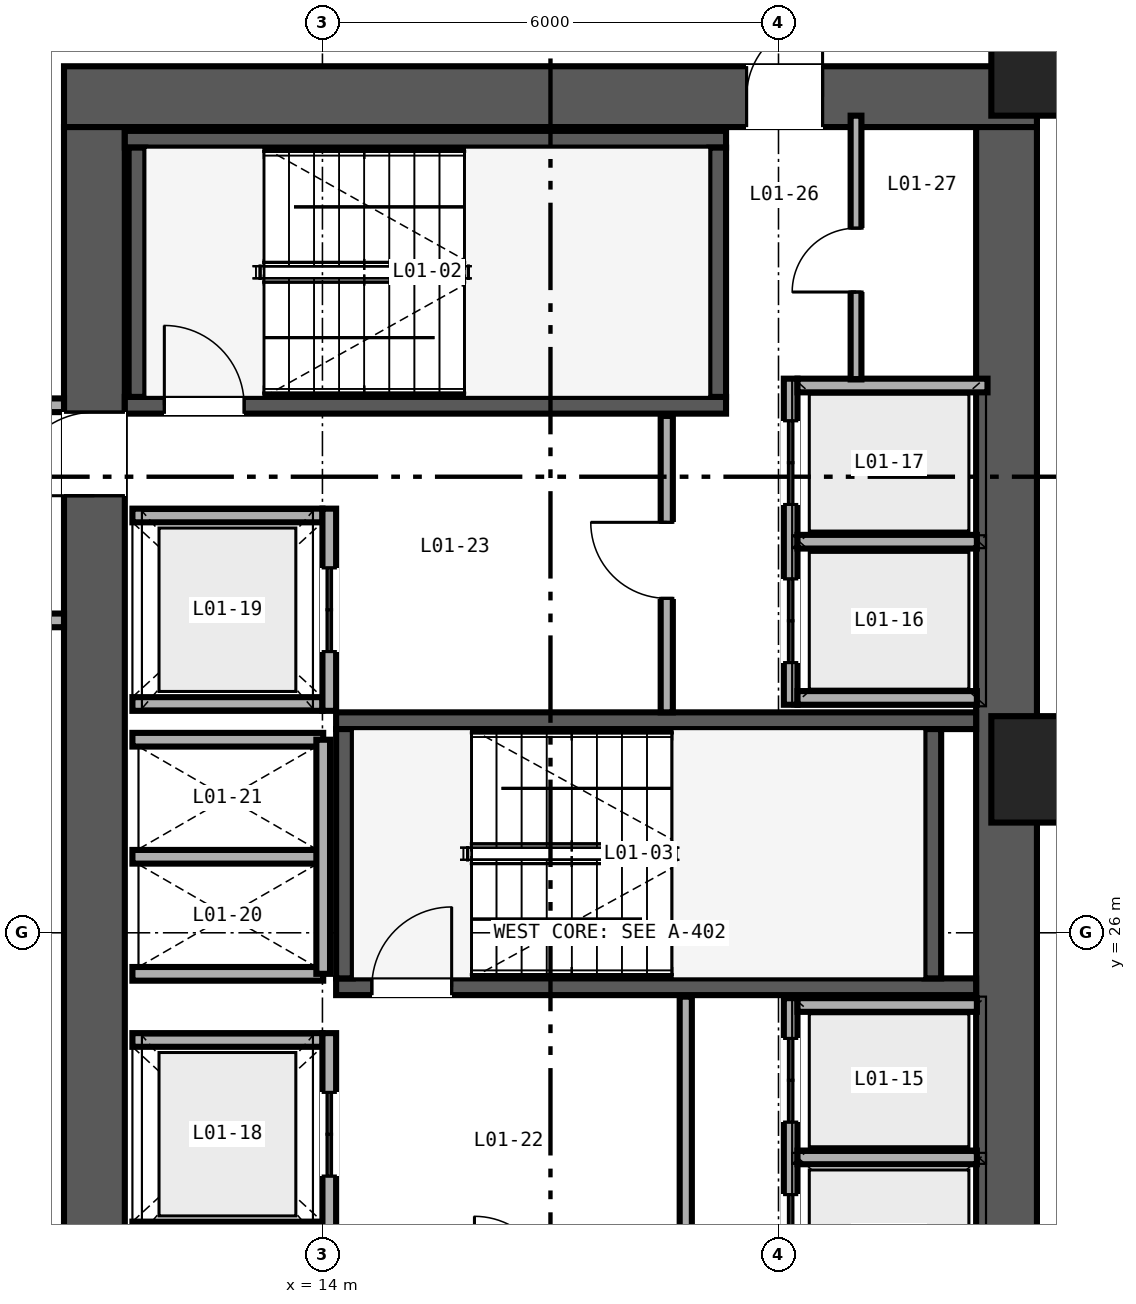
"""IFC4 building model, lengths in metres.
Left out: names, types, materials, properties, quantities, classifications, styles, units other than length and angle.
Written with IfcOpenShell. Run it as: python <this file> out.ifc"""

import sys

from ifc_helpers import new_model, si_unit, direction, frame, frame_2d, origin, origin_2d, place, context, subcontext, project, spatial, rectangle, extrude, source, transform, mapped, element, fill, save


model = new_model("IFC4")
c1 = context("Model", 3, precision=1e-05, world=origin(), true_north=direction((0.0, 1.0)))
c2 = subcontext(c1, "Body", "Model", "MODEL_VIEW")
j1 = project(units=[si_unit("LENGTHUNIT", "METRE"), si_unit("PLANEANGLEUNIT", "RADIAN")], contexts=[c1])
p1 = place(None, origin())
s1 = spatial("IfcSite", under=j1, at=p1, CompositionType="ELEMENT")
p2 = place(p1, origin())
s2 = spatial("IfcBuilding", under=s1, at=p2, CompositionType="ELEMENT")
p3 = place(p2, origin())
s3 = spatial("IfcBuildingStorey", under=s2, at=p3, CompositionType="ELEMENT", Elevation=0.0)
p4 = place(p3, frame((10.6, 37.0, 0.0), z_axis=(0.0, 0.0, 1.0), x_axis=(1.0, 0.0, 0.0)))
e1 = element("IfcWall", 1, at=p4, inside=s3, PredefinedType="SHEAR", context=c2, shape_type="SweptSolid", body=[
    extrude(rectangle(XDim=12.8, YDim=0.8, at=frame_2d((6.4, 0.0))), origin(), (0.0, 0.0, 1.0), 5.71),
])
p5 = place(p4, frame((8.98, 0.0, 0.0)))
e2 = element("IfcOpeningElement", 2, at=p5, cuts=e1, PredefinedType="OPENING", context=c2, shape_type="SweptSolid", body=[
    extrude(rectangle(XDim=1.0, YDim=2.15, at=frame_2d((0.5, 1.075))), frame((0.0, 0.41, 0.0), z_axis=(0.0, -1.0, 0.0), x_axis=(1.0, 0.0, 0.0)), (0.0, 0.0, 1.0), 0.82),
])
p6 = place(p3, frame((11.0, 15.4, 0.0), z_axis=(0.0, 0.0, 1.0), x_axis=(0.0, 1.0, 0.0)))
e3 = element("IfcWall", 3, at=p6, inside=s3, PredefinedType="SHEAR", context=c2, shape_type="SweptSolid", body=[
    extrude(rectangle(XDim=21.2, YDim=0.8, at=frame_2d((10.6, 0.0))), origin(), (0.0, 0.0, 1.0), 5.71),
])
p7 = place(p6, frame((4.15, 0.0, 0.0)))
e4 = element("IfcOpeningElement", 4, at=p7, cuts=e3, PredefinedType="OPENING", context=c2, shape_type="SweptSolid", body=[
    extrude(rectangle(XDim=1.1, YDim=2.15, at=frame_2d((0.55, 1.075))), frame((0.0, 0.41, 0.0), z_axis=(0.0, -1.0, 0.0), x_axis=(1.0, 0.0, 0.0)), (0.0, 0.0, 1.0), 0.82),
])
p8 = place(p6, frame((16.35, 0.0, 0.0)))
e5 = element("IfcOpeningElement", 5, at=p8, cuts=e3, PredefinedType="OPENING", context=c2, shape_type="SweptSolid", body=[
    extrude(rectangle(XDim=1.1, YDim=2.15, at=frame_2d((0.55, 1.075))), frame((0.0, 0.41, 0.0), z_axis=(0.0, -1.0, 0.0), x_axis=(1.0, 0.0, 0.0)), (0.0, 0.0, 1.0), 0.82),
])
p9 = place(p3, frame((23.0, 15.4, 0.0), z_axis=(0.0, 0.0, 1.0), x_axis=(0.0, 1.0, 0.0)))
e6 = element("IfcWall", 6, at=p9, inside=s3, PredefinedType="SHEAR", context=c2, shape_type="SweptSolid", body=[
    extrude(rectangle(XDim=21.2, YDim=0.8, at=frame_2d((10.6, 0.0))), origin(), (0.0, 0.0, 1.0), 5.71),
])
p10 = place(p3, frame((11.4, 32.94, 0.0), z_axis=(0.0, 0.0, 1.0), x_axis=(1.0, 0.0, 0.0)))
e7 = element("IfcWall", 7, at=p10, inside=s3, PredefinedType="SHEAR", context=c2, shape_type="SweptSolid", body=[
    extrude(rectangle(XDim=7.91, YDim=0.22, at=frame_2d((3.955, 0.0))), origin(), (0.0, 0.0, 1.0), 5.8),
])
p11 = place(p10, frame((0.52, 0.0, 0.0)))
e8 = element("IfcOpeningElement", 8, at=p11, cuts=e7, PredefinedType="OPENING", context=c2, shape_type="SweptSolid", body=[
    extrude(rectangle(XDim=1.05, YDim=2.15, at=frame_2d((0.525, 1.075))), frame((0.0, 0.12, 0.0), z_axis=(0.0, -1.0, 0.0), x_axis=(1.0, 0.0, 0.0)), (0.0, 0.0, 1.0), 0.24),
])
p12 = place(p3, frame((11.4, 36.44, 0.0), z_axis=(0.0, 0.0, 1.0), x_axis=(1.0, 0.0, 0.0)))
e9 = element("IfcWall", 9, at=p12, inside=s3, PredefinedType="SHEAR", context=c2, shape_type="SweptSolid", body=[
    extrude(rectangle(XDim=7.91, YDim=0.22, at=frame_2d((3.955, 0.0))), origin(), (0.0, 0.0, 1.0), 5.8),
])
for number, where, z_axis, x_axis in (
    (10, (11.56, 33.05, 0.0), (0.0, 0.0, 1.0), (0.0, 1.0, 0.0)),
    (11, (19.2, 33.05, 0.0), (0.0, 0.0, 1.0), (0.0, 1.0, 0.0)),
):
    element("IfcWall", number, at=place(p3, frame(where, z_axis=z_axis, x_axis=x_axis)), inside=s3, PredefinedType="SHEAR", context=c2, shape_type="SweptSolid", body=[
        extrude(rectangle(XDim=3.28, YDim=0.22, at=frame_2d((1.64, 0.0))), origin(), (0.0, 0.0, 1.0), 5.8),
    ])
p13 = place(p3, frame((14.18, 25.29, 0.0), z_axis=(0.0, 0.0, 1.0), x_axis=(1.0, 0.0, 0.0)))
e12 = element("IfcWall", 12, at=p13, inside=s3, PredefinedType="SHEAR", context=c2, shape_type="SweptSolid", body=[
    extrude(rectangle(XDim=8.42, YDim=0.22, at=frame_2d((4.21, 0.0))), origin(), (0.0, 0.0, 1.0), 5.8),
])
p14 = place(p13, frame((0.47, 0.0, 0.0)))
e13 = element("IfcOpeningElement", 13, at=p14, cuts=e12, PredefinedType="OPENING", context=c2, shape_type="SweptSolid", body=[
    extrude(rectangle(XDim=1.05, YDim=2.15, at=frame_2d((0.525, 1.075))), frame((0.0, 0.12, 0.0), z_axis=(0.0, -1.0, 0.0), x_axis=(1.0, 0.0, 0.0)), (0.0, 0.0, 1.0), 0.24),
])
p15 = place(p3, frame((14.18, 28.79, 0.0), z_axis=(0.0, 0.0, 1.0), x_axis=(1.0, 0.0, 0.0)))
e14 = element("IfcWall", 14, at=p15, inside=s3, PredefinedType="SHEAR", context=c2, shape_type="SweptSolid", body=[
    extrude(rectangle(XDim=8.42, YDim=0.22, at=frame_2d((4.21, 0.0))), origin(), (0.0, 0.0, 1.0), 5.8),
])
for number, where, z_axis, x_axis in (
    (15, (14.29, 25.4, 0.0), (0.0, 0.0, 1.0), (0.0, 1.0, 0.0)),
    (16, (22.03, 25.4, 0.0), (0.0, 0.0, 1.0), (0.0, 1.0, 0.0)),
):
    element("IfcWall", number, at=place(p3, frame(where, z_axis=z_axis, x_axis=x_axis)), inside=s3, PredefinedType="SHEAR", context=c2, shape_type="SweptSolid", body=[
        extrude(rectangle(XDim=3.28, YDim=0.22, at=frame_2d((1.64, 0.0))), origin(), (0.0, 0.0, 1.0), 5.8),
    ])
m1 = source(origin(), c2, "Body", "SweptSolid", [
    extrude(rectangle(XDim=1.4, YDim=1.4, at=origin_2d()), origin(), (0.0, 0.0, 1.0), 5.71),
])
for number, where, z_axis, x_axis in (
    (17, (23.5, 28.15, 0.0), (0.0, 0.0, 1.0), (1.0, 0.0, 0.0)),
    (18, (23.5, 37.45, 0.0), (0.0, 0.0, 1.0), (1.0, 0.0, 0.0)),
):
    element("IfcColumn", number, at=place(p3, frame(where, z_axis=z_axis, x_axis=x_axis)), inside=s3, PredefinedType="COLUMN", context=c2, shape_type="MappedRepresentation", body=[
        mapped(m1, transform((0.0, 0.0, 0.0), scale=1.0)),
    ])
p16 = place(p3, frame((20.16, 18.82, 0.0), z_axis=(0.0, 0.0, 1.0), x_axis=(0.0, 1.0, 0.0)))
e19 = element("IfcWall", 19, at=p16, inside=s3, PredefinedType="SOLIDWALL", context=c2, shape_type="SweptSolid", body=[
    extrude(rectangle(XDim=6.32, YDim=0.18, at=frame_2d((3.16, 0.0))), origin(), (0.0, 0.0, 1.0), 4.61),
])
p17 = place(p16, frame((0.555, 0.0, 0.0)))
e20 = element("IfcOpeningElement", 20, at=p17, cuts=e19, PredefinedType="OPENING", context=c2, shape_type="SweptSolid", body=[
    extrude(rectangle(XDim=1.1, YDim=2.2, at=frame_2d((0.55, 1.1))), frame((0.0, 0.1, 0.0), z_axis=(0.0, -1.0, 0.0), x_axis=(1.0, 0.0, 0.0)), (0.0, 0.0, 1.0), 0.2),
])
p18 = place(p16, frame((2.635, 0.0, 0.0)))
e21 = element("IfcOpeningElement", 21, at=p18, cuts=e19, PredefinedType="OPENING", context=c2, shape_type="SweptSolid", body=[
    extrude(rectangle(XDim=1.1, YDim=2.2, at=frame_2d((0.55, 1.1))), frame((0.0, 0.1, 0.0), z_axis=(0.0, -1.0, 0.0), x_axis=(1.0, 0.0, 0.0)), (0.0, 0.0, 1.0), 0.2),
])
p19 = place(p16, frame((4.69, 0.0, 0.0)))
e22 = element("IfcOpeningElement", 22, at=p19, cuts=e19, PredefinedType="OPENING", context=c2, shape_type="SweptSolid", body=[
    extrude(rectangle(XDim=1.1, YDim=2.2, at=frame_2d((0.55, 1.1))), frame((0.0, 0.1, 0.0), z_axis=(0.0, -1.0, 0.0), x_axis=(1.0, 0.0, 0.0)), (0.0, 0.0, 1.0), 0.2),
])
for number, where, z_axis, x_axis in (
    (23, (20.25, 25.05, 0.0), (0.0, 0.0, 1.0), (1.0, 0.0, 0.0)),
    (24, (20.25, 23.045, 0.0), (0.0, 0.0, 1.0), (1.0, 0.0, 0.0)),
):
    element("IfcWall", number, at=place(p3, frame(where, z_axis=z_axis, x_axis=x_axis)), inside=s3, PredefinedType="SOLIDWALL", context=c2, shape_type="SweptSolid", body=[
        extrude(rectangle(XDim=2.36, YDim=0.18, at=frame_2d((1.18, 0.0))), origin(), (0.0, 0.0, 1.0), 5.71),
    ])
p20 = place(p3, frame((20.16, 29.0, 0.0), z_axis=(0.0, 0.0, 1.0), x_axis=(0.0, 1.0, 0.0)))
e25 = element("IfcWall", 25, at=p20, inside=s3, PredefinedType="SOLIDWALL", context=c2, shape_type="SweptSolid", body=[
    extrude(rectangle(XDim=4.29, YDim=0.18, at=frame_2d((2.145, 0.0))), origin(), (0.0, 0.0, 1.0), 5.71),
])
p21 = place(p20, frame((0.555, 0.0, 0.0)))
e26 = element("IfcOpeningElement", 26, at=p21, cuts=e25, PredefinedType="OPENING", context=c2, shape_type="SweptSolid", body=[
    extrude(rectangle(XDim=1.1, YDim=2.2, at=frame_2d((0.55, 1.1))), frame((0.0, 0.1, 0.0), z_axis=(0.0, -1.0, 0.0), x_axis=(1.0, 0.0, 0.0)), (0.0, 0.0, 1.0), 0.2),
])
p22 = place(p20, frame((2.635, 0.0, 0.0)))
e27 = element("IfcOpeningElement", 27, at=p22, cuts=e25, PredefinedType="OPENING", context=c2, shape_type="SweptSolid", body=[
    extrude(rectangle(XDim=1.1, YDim=2.2, at=frame_2d((0.55, 1.1))), frame((0.0, 0.1, 0.0), z_axis=(0.0, -1.0, 0.0), x_axis=(1.0, 0.0, 0.0)), (0.0, 0.0, 1.0), 0.2),
])
p23 = place(p3, frame((20.25, 29.09, 0.0), z_axis=(0.0, 0.0, 1.0), x_axis=(1.0, 0.0, 0.0)))
e28 = element("IfcWall", 28, at=p23, inside=s3, PredefinedType="SOLIDWALL", context=c2, shape_type="SweptSolid", body=[
    extrude(rectangle(XDim=2.36, YDim=0.18, at=frame_2d((1.18, 0.0))), origin(), (0.0, 0.0, 1.0), 5.71),
])
p24 = place(p3, frame((20.25, 33.2, 0.0), z_axis=(0.0, 0.0, 1.0), x_axis=(1.0, 0.0, 0.0)))
e29 = element("IfcWall", 29, at=p24, inside=s3, PredefinedType="SOLIDWALL", context=c2, shape_type="SweptSolid", body=[
    extrude(rectangle(XDim=2.5, YDim=0.18, at=frame_2d((1.25, 0.0))), origin(), (0.0, 0.0, 1.0), 5.71),
])
p25 = place(p3, frame((20.25, 31.145, 0.0), z_axis=(0.0, 0.0, 1.0), x_axis=(1.0, 0.0, 0.0)))
e30 = element("IfcWall", 30, at=p25, inside=s3, PredefinedType="SOLIDWALL", context=c2, shape_type="SweptSolid", body=[
    extrude(rectangle(XDim=2.36, YDim=0.18, at=frame_2d((1.18, 0.0))), origin(), (0.0, 0.0, 1.0), 5.71),
])
for number, where, z_axis, x_axis in (
    (31, (11.5, 22.11, 0.0), (0.0, 0.0, 1.0), (1.0, 0.0, 0.0)),
    (32, (11.5, 24.59, 0.0), (0.0, 0.0, 1.0), (1.0, 0.0, 0.0)),
):
    element("IfcWall", number, at=place(p3, frame(where, z_axis=z_axis, x_axis=x_axis)), inside=s3, PredefinedType="SOLIDWALL", context=c2, shape_type="SweptSolid", body=[
        extrude(rectangle(XDim=2.5, YDim=0.18, at=frame_2d((1.25, 0.0))), origin(), (0.0, 0.0, 1.0), 5.71),
    ])
p26 = place(p3, frame((14.09, 22.02, 0.0), z_axis=(0.0, 0.0, 1.0), x_axis=(0.0, 1.0, 0.0)))
e33 = element("IfcWall", 33, at=p26, inside=s3, PredefinedType="SOLIDWALL", context=c2, shape_type="SweptSolid", body=[
    extrude(rectangle(XDim=2.66, YDim=0.18, at=frame_2d((1.33, 0.0))), origin(), (0.0, 0.0, 1.0), 5.71),
])
p27 = place(p26, frame((0.78, 0.0, 0.0)))
e34 = element("IfcOpeningElement", 34, at=p27, cuts=e33, PredefinedType="OPENING", context=c2, shape_type="SweptSolid", body=[
    extrude(rectangle(XDim=1.1, YDim=2.2, at=frame_2d((0.55, 1.1))), frame((0.0, 0.1, 0.0), z_axis=(0.0, -1.0, 0.0), x_axis=(1.0, 0.0, 0.0)), (0.0, 0.0, 1.0), 0.2),
])
for number, where, z_axis, x_axis in (
    (35, (11.5, 29.01, 0.0), (0.0, 0.0, 1.0), (1.0, 0.0, 0.0)),
    (36, (11.5, 31.49, 0.0), (0.0, 0.0, 1.0), (1.0, 0.0, 0.0)),
):
    element("IfcWall", number, at=place(p3, frame(where, z_axis=z_axis, x_axis=x_axis)), inside=s3, PredefinedType="SOLIDWALL", context=c2, shape_type="SweptSolid", body=[
        extrude(rectangle(XDim=2.5, YDim=0.18, at=frame_2d((1.25, 0.0))), origin(), (0.0, 0.0, 1.0), 5.71),
    ])
p28 = place(p3, frame((14.09, 28.92, 0.0), z_axis=(0.0, 0.0, 1.0), x_axis=(0.0, 1.0, 0.0)))
e37 = element("IfcWall", 37, at=p28, inside=s3, PredefinedType="SOLIDWALL", context=c2, shape_type="SweptSolid", body=[
    extrude(rectangle(XDim=2.66, YDim=0.18, at=frame_2d((1.33, 0.0))), origin(), (0.0, 0.0, 1.0), 5.71),
])
p29 = place(p28, frame((0.78, 0.0, 0.0)))
e38 = element("IfcOpeningElement", 38, at=p29, cuts=e37, PredefinedType="OPENING", context=c2, shape_type="SweptSolid", body=[
    extrude(rectangle(XDim=1.1, YDim=2.2, at=frame_2d((0.55, 1.1))), frame((0.0, 0.1, 0.0), z_axis=(0.0, -1.0, 0.0), x_axis=(1.0, 0.0, 0.0)), (0.0, 0.0, 1.0), 0.2),
])
for number, where, z_axis, x_axis in (
    (39, (11.5, 25.46, 0.0), (0.0, 0.0, 1.0), (1.0, 0.0, 0.0)),
    (40, (11.5, 27.0, 0.0), (0.0, 0.0, 1.0), (1.0, 0.0, 0.0)),
    (41, (11.5, 28.54, 0.0), (0.0, 0.0, 1.0), (1.0, 0.0, 0.0)),
):
    element("IfcWall", number, at=place(p3, frame(where, z_axis=z_axis, x_axis=x_axis)), inside=s3, PredefinedType="SOLIDWALL", context=c2, shape_type="SweptSolid", body=[
        extrude(rectangle(XDim=2.51, YDim=0.18, at=frame_2d((1.255, 0.0))), origin(), (0.0, 0.0, 1.0), 5.71),
    ])
p30 = place(p3, frame((14.01, 25.46, 0.0), z_axis=(0.0, 0.0, 1.0), x_axis=(0.0, 1.0, 0.0)))
e42 = element("IfcWall", 42, at=p30, inside=s3, PredefinedType="SOLIDWALL", context=c2, shape_type="SweptSolid", body=[
    extrude(rectangle(XDim=3.08, YDim=0.18, at=frame_2d((1.54, 0.0))), origin(), (0.0, 0.0, 1.0), 5.71),
])
p31 = place(p3, frame((18.78, 21.35, 0.0), z_axis=(0.0, 0.0, 1.0), x_axis=(0.0, 1.0, 0.0)))
e43 = element("IfcWall", 43, at=p31, inside=s3, PredefinedType="PARTITIONING", context=c2, shape_type="SweptSolid", body=[
    extrude(rectangle(XDim=3.81, YDim=0.16, at=frame_2d((1.905, 0.0))), origin(), (0.0, 0.0, 1.0), 5.71),
])
p32 = place(p3, frame((18.53, 28.9, 0.0), z_axis=(0.0, 0.0, 1.0), x_axis=(0.0, 1.0, 0.0)))
e44 = element("IfcWall", 44, at=p32, inside=s3, PredefinedType="PARTITIONING", context=c2, shape_type="SweptSolid", body=[
    extrude(rectangle(XDim=3.9, YDim=0.16, at=frame_2d((1.95, 0.0))), origin(), (0.0, 0.0, 1.0), 5.71),
])
p33 = place(p32, frame((1.5, 0.0, 0.0)))
e45 = element("IfcOpeningElement", 45, at=p33, cuts=e44, PredefinedType="OPENING", context=c2, shape_type="SweptSolid", body=[
    extrude(rectangle(XDim=1.0, YDim=2.15, at=frame_2d((0.5, 1.075))), frame((0.0, 0.09, 0.0), z_axis=(0.0, -1.0, 0.0), x_axis=(1.0, 0.0, 0.0)), (0.0, 0.0, 1.0), 0.18),
])
p34 = place(p3, frame((21.02, 33.28, 0.0), z_axis=(0.0, 0.0, 1.0), x_axis=(0.0, 1.0, 0.0)))
e46 = element("IfcWall", 46, at=p34, inside=s3, PredefinedType="PARTITIONING", context=c2, shape_type="SweptSolid", body=[
    extrude(rectangle(XDim=3.47, YDim=0.142, at=frame_2d((1.735, 0.0))), origin(), (0.0, 0.0, 1.0), 5.71),
])
p35 = place(p34, frame((1.15, 0.0, 0.0)))
e47 = element("IfcOpeningElement", 47, at=p35, cuts=e46, PredefinedType="OPENING", context=c2, shape_type="SweptSolid", body=[
    extrude(rectangle(XDim=0.84, YDim=2.1, at=frame_2d((0.42, 1.05))), frame((0.0, 0.081, 0.0), z_axis=(0.0, -1.0, 0.0), x_axis=(1.0, 0.0, 0.0)), (0.0, 0.0, 1.0), 0.162),
])
p36 = place(p3, frame((0.35, 30.11, 0.0), z_axis=(0.0, 0.0, 1.0), x_axis=(1.0, 0.0, 0.0)))
e48 = element("IfcWall", 48, at=p36, inside=s3, PredefinedType="SOLIDWALL", context=c2, shape_type="SweptSolid", body=[
    extrude(rectangle(XDim=10.25, YDim=0.18, at=frame_2d((5.125, 0.0))), origin(), (0.0, 0.0, 1.0), 4.931),
])
p37 = place(p36, frame((4.2, 0.0, 0.0)))
e49 = element("IfcOpeningElement", 49, at=p37, cuts=e48, PredefinedType="OPENING", context=c2, shape_type="SweptSolid", body=[
    extrude(rectangle(XDim=1.0, YDim=2.15, at=frame_2d((0.5, 1.075))), frame((0.0, 0.1, 0.0), z_axis=(0.0, -1.0, 0.0), x_axis=(1.0, 0.0, 0.0)), (0.0, 0.0, 1.0), 0.2),
])
p38 = place(p3, frame((0.35, 32.94, 0.0), z_axis=(0.0, 0.0, 1.0), x_axis=(1.0, 0.0, 0.0)))
e50 = element("IfcWall", 50, at=p38, inside=s3, PredefinedType="SOLIDWALL", context=c2, shape_type="SweptSolid", body=[
    extrude(rectangle(XDim=10.25, YDim=0.18, at=frame_2d((5.125, 0.0))), origin(), (0.0, 0.0, 1.0), 4.931),
])
m2 = source(origin(), c2, "Body", "SweptSolid", [
    extrude(rectangle(XDim=1.05, YDim=2.15, at=frame_2d((0.525, 1.075))), frame((0.0, 0.025, 0.0), z_axis=(0.0, -1.0, 0.0), x_axis=(1.0, 0.0, 0.0)), (0.0, 0.0, 1.0), 0.05),
])
p39 = place(p11, origin())
e51 = element("IfcDoor", 51, at=p39, inside=s3, OperationType="SINGLE_SWING_LEFT", PredefinedType="DOOR", context=c2, shape_type="MappedRepresentation", body=[
    mapped(m2, transform((0.0, 0.0, 0.0), scale=1.0)),
])
fill(e8, e51)
p40 = place(p14, origin())
e52 = element("IfcDoor", 52, at=p40, inside=s3, OperationType="SINGLE_SWING_RIGHT", PredefinedType="DOOR", context=c2, shape_type="MappedRepresentation", body=[
    mapped(m2, transform((0.0, 0.0, 0.0), scale=1.0)),
])
fill(e13, e52)
m3 = source(origin(), c2, "Body", "SweptSolid", [
    extrude(rectangle(XDim=1.1, YDim=2.2, at=frame_2d((0.55, 1.1))), frame((0.0, 0.025, 0.0), z_axis=(0.0, -1.0, 0.0), x_axis=(1.0, 0.0, 0.0)), (0.0, 0.0, 1.0), 0.05),
])
p41 = place(p18, origin())
e53 = element("IfcDoor", 53, at=p41, inside=s3, OperationType="DOUBLE_DOOR_SLIDING", PredefinedType="DOOR", context=c2, shape_type="MappedRepresentation", body=[
    mapped(m3, transform((0.0, 0.0, 0.0), scale=1.0)),
])
fill(e21, e53)
p42 = place(p19, origin())
e54 = element("IfcDoor", 54, at=p42, inside=s3, OperationType="DOUBLE_DOOR_SLIDING", PredefinedType="DOOR", context=c2, shape_type="MappedRepresentation", body=[
    mapped(m3, transform((0.0, 0.0, 0.0), scale=1.0)),
])
fill(e22, e54)
p43 = place(p21, origin())
e55 = element("IfcDoor", 55, at=p43, inside=s3, OperationType="DOUBLE_DOOR_SLIDING", PredefinedType="DOOR", context=c2, shape_type="MappedRepresentation", body=[
    mapped(m3, transform((0.0, 0.0, 0.0), scale=1.0)),
])
fill(e26, e55)
p44 = place(p22, origin())
e56 = element("IfcDoor", 56, at=p44, inside=s3, OperationType="DOUBLE_DOOR_SLIDING", PredefinedType="DOOR", context=c2, shape_type="MappedRepresentation", body=[
    mapped(m3, transform((0.0, 0.0, 0.0), scale=1.0)),
])
fill(e27, e56)
p45 = place(p27, origin())
e57 = element("IfcDoor", 57, at=p45, inside=s3, OperationType="DOUBLE_DOOR_SLIDING", PredefinedType="DOOR", context=c2, shape_type="MappedRepresentation", body=[
    mapped(m3, transform((0.0, 0.0, 0.0), scale=1.0)),
])
fill(e34, e57)
p46 = place(p29, origin())
e58 = element("IfcDoor", 58, at=p46, inside=s3, OperationType="DOUBLE_DOOR_SLIDING", PredefinedType="DOOR", context=c2, shape_type="MappedRepresentation", body=[
    mapped(m3, transform((0.0, 0.0, 0.0), scale=1.0)),
])
fill(e38, e58)
m4 = source(origin(), c2, "Body", "SweptSolid", [
    extrude(rectangle(XDim=1.0, YDim=2.15, at=frame_2d((0.5, 1.075))), frame((0.0, 0.025, 0.0), z_axis=(0.0, -1.0, 0.0), x_axis=(1.0, 0.0, 0.0)), (0.0, 0.0, 1.0), 0.05),
])
p47 = place(p33, origin())
e59 = element("IfcDoor", 59, at=p47, inside=s3, OperationType="SINGLE_SWING_RIGHT", PredefinedType="DOOR", context=c2, shape_type="MappedRepresentation", body=[
    mapped(m4, transform((0.0, 0.0, 0.0), scale=1.0)),
])
fill(e45, e59)
m5 = source(origin(), c2, "Body", "SweptSolid", [
    extrude(rectangle(XDim=1.1, YDim=2.15, at=frame_2d((0.55, 1.075))), frame((0.0, 0.025, 0.0), z_axis=(0.0, -1.0, 0.0), x_axis=(1.0, 0.0, 0.0)), (0.0, 0.0, 1.0), 0.05),
])
p48 = place(p8, origin())
e60 = element("IfcDoor", 60, at=p48, inside=s3, OperationType="SINGLE_SWING_LEFT", PredefinedType="DOOR", context=c2, shape_type="MappedRepresentation", body=[
    mapped(m5, transform((0.0, 0.0, 0.0), scale=1.0)),
])
fill(e5, e60)
m6 = source(origin(), c2, "Body", "SweptSolid", [
    extrude(rectangle(XDim=0.84, YDim=2.1, at=frame_2d((0.42, 1.05))), frame((0.0, 0.025, 0.0), z_axis=(0.0, -1.0, 0.0), x_axis=(1.0, 0.0, 0.0)), (0.0, 0.0, 1.0), 0.05),
])
p49 = place(p35, origin())
e61 = element("IfcDoor", 61, at=p49, inside=s3, OperationType="SINGLE_SWING_LEFT", PredefinedType="DOOR", context=c2, shape_type="MappedRepresentation", body=[
    mapped(m6, transform((0.0, 0.0, 0.0), scale=1.0)),
])
fill(e47, e61)
p50 = place(p5, origin())
e62 = element("IfcDoor", 62, at=p50, inside=s3, OperationType="SINGLE_SWING_RIGHT", PredefinedType="DOOR", context=c2, shape_type="MappedRepresentation", body=[
    mapped(m4, transform((0.0, 0.0, 0.0), scale=1.0)),
])
fill(e2, e62)
save(model, sys.argv[1])
